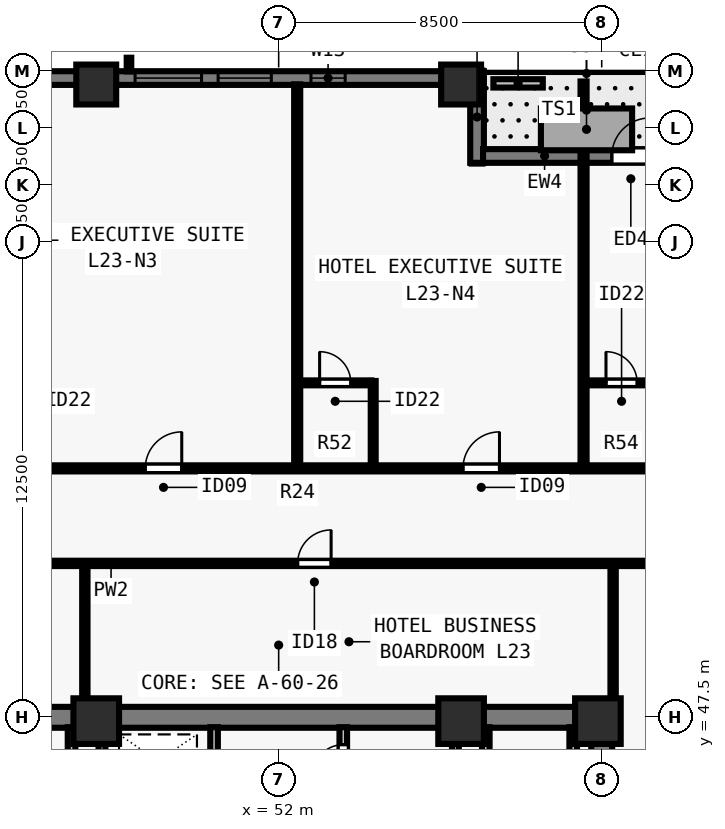
"""IFC4 building model, lengths in metres.
Left out: names, types, materials, properties, quantities, classifications, styles, units other than length and angle.
Written with IfcOpenShell. Run it as: python <this file> out.ifc"""

import sys

from ifc_helpers import new_model, si_unit, direction, frame, frame_2d, origin, origin_2d, place, context, subcontext, project, spatial, rectangle, extrude, element, fill, save


model = new_model("IFC4")
c1 = context("Model", 3, precision=1e-05, world=origin(), true_north=direction((0.0, 1.0)))
c2 = subcontext(c1, "Body", "Model", "MODEL_VIEW")
j1 = project(units=[si_unit("LENGTHUNIT", "METRE"), si_unit("PLANEANGLEUNIT", "RADIAN")], contexts=[c1])
p1 = place(None, origin())
s1 = spatial("IfcSite", under=j1, at=p1, CompositionType="ELEMENT")
p2 = place(p1, origin())
s2 = spatial("IfcBuilding", under=s1, at=p2, CompositionType="ELEMENT")
p3 = place(p2, frame((0.0, 0.0, 86.5)))
s3 = spatial("IfcBuildingStorey", under=s2, at=p3, CompositionType="ELEMENT", Elevation=86.5)
for number, where, z_axis, x_axis in (
    (1, (47.2, 47.4, 0.0), (0.0, 0.0, 1.0), (1.0, 0.0, 0.0)),
    (2, (56.8, 47.4, 0.0), (0.0, 0.0, 1.0), (1.0, 0.0, 0.0)),
    (3, (60.4, 47.4, 0.0), (0.0, 0.0, 1.0), (1.0, 0.0, 0.0)),
):
    element("IfcColumn", number, at=place(p3, frame(where, z_axis=z_axis, x_axis=x_axis)), inside=s3, PredefinedType="COLUMN", context=c2, shape_type="SweptSolid", body=[
        extrude(rectangle(XDim=1.2, YDim=1.2, at=origin_2d()), origin(), (0.0, 0.0, 1.0), 3.5),
    ])
for number, where, z_axis, x_axis in (
    (4, (56.8, 64.15, 0.0), (0.0, 0.0, 1.0), (1.0, 0.0, 0.0)),
    (5, (47.2, 64.15, 0.0), (0.0, 0.0, 1.0), (1.0, 0.0, 0.0)),
):
    element("IfcColumn", number, at=place(p3, frame(where, z_axis=z_axis, x_axis=x_axis)), inside=s3, PredefinedType="COLUMN", context=c2, shape_type="SweptSolid", body=[
        extrude(rectangle(XDim=1.05, YDim=1.05, at=origin_2d()), origin(), (0.0, 0.0, 1.0), 3.5),
    ])
p4 = place(p3, frame((29.5, 64.32, 0.0), z_axis=(0.0, 0.0, 1.0), x_axis=(1.0, 0.0, 0.0)))
e6 = element("IfcWall", 6, at=p4, inside=s3, PredefinedType="SOLIDWALL", context=c2, shape_type="SweptSolid", body=[
    extrude(rectangle(XDim=27.562, YDim=0.36, at=frame_2d((13.781, 0.0))), origin(), (0.0, 0.0, 1.0), 3.28),
])
p5 = place(p4, frame((4.18, 0.0, 0.8)))
e7 = element("IfcOpeningElement", 7, at=p5, cuts=e6, PredefinedType="OPENING", context=c2, shape_type="SweptSolid", body=[
    extrude(rectangle(XDim=1.75, YDim=1.544, at=frame_2d((0.875, 0.772))), frame((0.0, 0.19, 0.0), z_axis=(0.0, -1.0, 0.0), x_axis=(1.0, 0.0, 0.0)), (0.0, 0.0, 1.0), 0.38),
])
p6 = place(p4, frame((8.115, 0.0, 0.8)))
e8 = element("IfcOpeningElement", 8, at=p6, cuts=e6, PredefinedType="OPENING", context=c2, shape_type="SweptSolid", body=[
    extrude(rectangle(XDim=1.4, YDim=1.544, at=frame_2d((0.7, 0.772))), frame((0.0, 0.19, 0.0), z_axis=(0.0, -1.0, 0.0), x_axis=(1.0, 0.0, 0.0)), (0.0, 0.0, 1.0), 0.38),
])
p7 = place(p4, frame((11.251, 0.0, 0.8)))
e9 = element("IfcOpeningElement", 9, at=p7, cuts=e6, PredefinedType="OPENING", context=c2, shape_type="SweptSolid", body=[
    extrude(rectangle(XDim=1.75, YDim=1.544, at=frame_2d((0.875, 0.772))), frame((0.0, 0.19, 0.0), z_axis=(0.0, -1.0, 0.0), x_axis=(1.0, 0.0, 0.0)), (0.0, 0.0, 1.0), 0.38),
])
p8 = place(p4, frame((14.736, 0.0, 0.8)))
e10 = element("IfcOpeningElement", 10, at=p8, cuts=e6, PredefinedType="OPENING", context=c2, shape_type="SweptSolid", body=[
    extrude(rectangle(XDim=1.4, YDim=1.544, at=frame_2d((0.7, 0.772))), frame((0.0, 0.19, 0.0), z_axis=(0.0, -1.0, 0.0), x_axis=(1.0, 0.0, 0.0)), (0.0, 0.0, 1.0), 0.38),
])
p9 = place(p4, frame((18.721, 0.0, 0.8)))
e11 = element("IfcOpeningElement", 11, at=p9, cuts=e6, PredefinedType="OPENING", context=c2, shape_type="SweptSolid", body=[
    extrude(rectangle(XDim=1.75, YDim=1.544, at=frame_2d((0.875, 0.772))), frame((0.0, 0.19, 0.0), z_axis=(0.0, -1.0, 0.0), x_axis=(1.0, 0.0, 0.0)), (0.0, 0.0, 1.0), 0.38),
])
p10 = place(p4, frame((20.907, 0.0, 0.8)))
e12 = element("IfcOpeningElement", 12, at=p10, cuts=e6, PredefinedType="OPENING", context=c2, shape_type="SweptSolid", body=[
    extrude(rectangle(XDim=1.4, YDim=1.544, at=frame_2d((0.7, 0.772))), frame((0.0, 0.19, 0.0), z_axis=(0.0, -1.0, 0.0), x_axis=(1.0, 0.0, 0.0)), (0.0, 0.0, 1.0), 0.38),
])
p11 = place(p4, frame((23.35, 0.0, 0.8)))
e13 = element("IfcOpeningElement", 13, at=p11, cuts=e6, PredefinedType="OPENING", context=c2, shape_type="SweptSolid", body=[
    extrude(rectangle(XDim=0.9, YDim=1.544, at=frame_2d((0.45, 0.772))), frame((0.0, 0.19, 0.0), z_axis=(0.0, -1.0, 0.0), x_axis=(1.0, 0.0, 0.0)), (0.0, 0.0, 1.0), 0.38),
])
p12 = place(p3, frame((57.22, 64.5, 0.0), z_axis=(0.0, 0.0, 1.0), x_axis=(0.0, -1.0, 0.0)))
e14 = element("IfcWall", 14, at=p12, inside=s3, PredefinedType="SOLIDWALL", context=c2, shape_type="SweptSolid", body=[
    extrude(rectangle(XDim=2.41, YDim=0.36, at=frame_2d((1.205, 0.0))), origin(), (0.0, 0.0, 1.0), 3.28),
])
p13 = place(p3, frame((57.378, 62.27, 0.0), z_axis=(0.0, 0.0, 1.0), x_axis=(1.0, 0.0, 0.0)))
e15 = element("IfcWall", 15, at=p13, inside=s3, PredefinedType="SOLIDWALL", context=c2, shape_type="SweptSolid", body=[
    extrude(rectangle(XDim=5.782, YDim=0.36, at=frame_2d((2.891, 0.0))), origin(), (0.0, 0.0, 1.0), 3.28),
])
p14 = place(p13, frame((3.388, 0.0, 0.0)))
e16 = element("IfcOpeningElement", 16, at=p14, cuts=e15, PredefinedType="OPENING", context=c2, shape_type="SweptSolid", body=[
    extrude(rectangle(XDim=1.0, YDim=2.15, at=frame_2d((0.5, 1.075))), frame((0.0, 0.19, 0.0), z_axis=(0.0, -1.0, 0.0), x_axis=(1.0, 0.0, 0.0)), (0.0, 0.0, 1.0), 0.38),
])
p15 = place(p3, frame((57.65, 64.18, 0.0), z_axis=(0.0, 0.0, 1.0), x_axis=(1.0, 0.0, 0.0)))
e17 = element("IfcWall", 17, at=p15, inside=s3, PredefinedType="PARAPET", context=c2, shape_type="SweptSolid", body=[
    extrude(rectangle(XDim=1.3, YDim=0.22, at=frame_2d((0.65, 0.0))), origin(), (0.0, 0.0, 1.0), 0.55),
])
p16 = place(p3, frame((43.225, 47.5, 0.0), z_axis=(0.0, 0.0, 1.0), x_axis=(1.0, 0.0, 0.0)))
e18 = element("IfcWall", 18, at=p16, inside=s3, PredefinedType="SHEAR", context=c2, shape_type="SweptSolid", body=[
    extrude(rectangle(XDim=17.55, YDim=0.55, at=frame_2d((8.775, 0.0))), origin(), (0.0, 0.0, 1.0), 3.28),
])
p17 = place(p3, frame((60.5, 40.8, 0.0), z_axis=(0.0, 0.0, 1.0), x_axis=(0.0, 1.0, 0.0)))
e19 = element("IfcWall", 19, at=p17, inside=s3, PredefinedType="SHEAR", context=c2, shape_type="SweptSolid", body=[
    extrude(rectangle(XDim=6.435, YDim=0.55, at=frame_2d((3.218, 0.0))), origin(), (0.0, 0.0, 1.0), 3.28),
])
p18 = place(p3, frame((50.3, 40.585, 0.0), z_axis=(0.0, 0.0, 1.0), x_axis=(0.0, 1.0, 0.0)))
e20 = element("IfcWall", 20, at=p18, inside=s3, PredefinedType="SOLIDWALL", context=c2, shape_type="SweptSolid", body=[
    extrude(rectangle(XDim=6.655, YDim=0.2, at=frame_2d((3.328, 0.0))), origin(), (0.0, 0.0, 1.0), 3.28),
])
p19 = place(p18, frame((5.065, 0.0, 0.0)))
e21 = element("IfcOpeningElement", 21, at=p19, cuts=e20, PredefinedType="OPENING", context=c2, shape_type="SweptSolid", body=[
    extrude(rectangle(XDim=0.8, YDim=2.08, at=frame_2d((0.4, 1.04))), frame((0.0, 0.11, 0.0), z_axis=(0.0, -1.0, 0.0), x_axis=(1.0, 0.0, 0.0)), (0.0, 0.0, 1.0), 0.22),
])
p20 = place(p3, frame((53.7, 40.585, 0.0), z_axis=(0.0, 0.0, 1.0), x_axis=(0.0, 1.0, 0.0)))
e22 = element("IfcWall", 22, at=p20, inside=s3, PredefinedType="SOLIDWALL", context=c2, shape_type="SweptSolid", body=[
    extrude(rectangle(XDim=6.655, YDim=0.2, at=frame_2d((3.328, 0.0))), origin(), (0.0, 0.0, 1.0), 3.28),
])
p21 = place(p20, frame((0.195, 0.0, 0.0)))
e23 = element("IfcOpeningElement", 23, at=p21, cuts=e22, PredefinedType="OPENING", context=c2, shape_type="SweptSolid", body=[
    extrude(rectangle(XDim=0.8, YDim=2.08, at=frame_2d((0.4, 1.04))), frame((0.0, 0.11, 0.0), z_axis=(0.0, -1.0, 0.0), x_axis=(1.0, 0.0, 0.0)), (0.0, 0.0, 1.0), 0.22),
])
p22 = place(p20, frame((3.735, 0.0, 0.0)))
e24 = element("IfcOpeningElement", 24, at=p22, cuts=e22, PredefinedType="OPENING", context=c2, shape_type="SweptSolid", body=[
    extrude(rectangle(XDim=0.9, YDim=2.12, at=frame_2d((0.45, 1.06))), frame((0.0, 0.11, 0.0), z_axis=(0.0, -1.0, 0.0), x_axis=(1.0, 0.0, 0.0)), (0.0, 0.0, 1.0), 0.22),
])
p23 = place(p20, frame((5.395, 0.0, 0.0)))
e25 = element("IfcOpeningElement", 25, at=p23, cuts=e22, PredefinedType="OPENING", context=c2, shape_type="SweptSolid", body=[
    extrude(rectangle(XDim=0.8, YDim=2.1, at=frame_2d((0.4, 1.05))), frame((0.0, 0.11, 0.0), z_axis=(0.0, -1.0, 0.0), x_axis=(1.0, 0.0, 0.0)), (0.0, 0.0, 1.0), 0.22),
])
for number, where, z_axis, x_axis in (
    (26, (46.55, 43.735, 0.0), (0.0, 0.0, 1.0), (0.0, 1.0, 0.0)),
    (27, (57.45, 43.735, 0.0), (0.0, 0.0, 1.0), (0.0, 1.0, 0.0)),
    (28, (59.75, 43.735, 0.0), (0.0, 0.0, 1.0), (0.0, 1.0, 0.0)),
):
    element("IfcWall", number, at=place(p3, frame(where, z_axis=z_axis, x_axis=x_axis)), inside=s3, PredefinedType="SOLIDWALL", context=c2, shape_type="SweptSolid", body=[
        extrude(rectangle(XDim=3.505, YDim=0.2, at=frame_2d((1.752, 0.0))), origin(), (0.0, 0.0, 1.0), 3.28),
    ])
for number, where, z_axis, x_axis in (
    (29, (47.35, 43.735, 0.0), (0.0, 0.0, 1.0), (0.0, 1.0, 0.0)),
    (30, (56.65, 43.735, 0.0), (0.0, 0.0, 1.0), (0.0, 1.0, 0.0)),
):
    element("IfcWall", number, at=place(p3, frame(where, z_axis=z_axis, x_axis=x_axis)), inside=s3, PredefinedType="SOLIDWALL", context=c2, shape_type="SweptSolid", body=[
        extrude(rectangle(XDim=3.505, YDim=0.18, at=frame_2d((1.752, 0.0))), origin(), (0.0, 0.0, 1.0), 3.28),
    ])
p24 = place(p3, frame((37.1, 54.05, 0.0), z_axis=(0.0, 0.0, 1.0), x_axis=(1.0, 0.0, 0.0)))
e31 = element("IfcWall", 31, at=p24, inside=s3, PredefinedType="PARTITIONING", context=c2, shape_type="SweptSolid", body=[
    extrude(rectangle(XDim=29.8, YDim=0.16, at=frame_2d((14.9, 0.0))), origin(), (0.0, 0.0, 1.0), 3.28),
])
p25 = place(p24, frame((0.91, 0.0, 0.0)))
e32 = element("IfcOpeningElement", 32, at=p25, cuts=e31, PredefinedType="OPENING", context=c2, shape_type="SweptSolid", body=[
    extrude(rectangle(XDim=0.96, YDim=2.15, at=frame_2d((0.48, 1.075))), frame((0.0, 0.09, 0.0), z_axis=(0.0, -1.0, 0.0), x_axis=(1.0, 0.0, 0.0)), (0.0, 0.0, 1.0), 0.18),
])
p26 = place(p24, frame((3.03, 0.0, 0.0)))
e33 = element("IfcOpeningElement", 33, at=p26, cuts=e31, PredefinedType="OPENING", context=c2, shape_type="SweptSolid", body=[
    extrude(rectangle(XDim=0.96, YDim=2.15, at=frame_2d((0.48, 1.075))), frame((0.0, 0.09, 0.0), z_axis=(0.0, -1.0, 0.0), x_axis=(1.0, 0.0, 0.0)), (0.0, 0.0, 1.0), 0.18),
])
p27 = place(p24, frame((11.39, 0.0, 0.0)))
e34 = element("IfcOpeningElement", 34, at=p27, cuts=e31, PredefinedType="OPENING", context=c2, shape_type="SweptSolid", body=[
    extrude(rectangle(XDim=0.96, YDim=2.15, at=frame_2d((0.48, 1.075))), frame((0.0, 0.09, 0.0), z_axis=(0.0, -1.0, 0.0), x_axis=(1.0, 0.0, 0.0)), (0.0, 0.0, 1.0), 0.18),
])
p28 = place(p24, frame((19.75, 0.0, 0.0)))
e35 = element("IfcOpeningElement", 35, at=p28, cuts=e31, PredefinedType="OPENING", context=c2, shape_type="SweptSolid", body=[
    extrude(rectangle(XDim=0.96, YDim=2.15, at=frame_2d((0.48, 1.075))), frame((0.0, 0.09, 0.0), z_axis=(0.0, -1.0, 0.0), x_axis=(1.0, 0.0, 0.0)), (0.0, 0.0, 1.0), 0.18),
])
p29 = place(p24, frame((26.931, 0.0, 0.0)))
e36 = element("IfcOpeningElement", 36, at=p29, cuts=e31, PredefinedType="OPENING", context=c2, shape_type="SweptSolid", body=[
    extrude(rectangle(XDim=0.96, YDim=2.15, at=frame_2d((0.48, 1.075))), frame((0.0, 0.09, 0.0), z_axis=(0.0, -1.0, 0.0), x_axis=(1.0, 0.0, 0.0)), (0.0, 0.0, 1.0), 0.18),
])
p30 = place(p24, frame((28.48, 0.0, 0.0)))
e37 = element("IfcOpeningElement", 37, at=p30, cuts=e31, PredefinedType="OPENING", context=c2, shape_type="SweptSolid", body=[
    extrude(rectangle(XDim=0.96, YDim=2.15, at=frame_2d((0.48, 1.075))), frame((0.0, 0.09, 0.0), z_axis=(0.0, -1.0, 0.0), x_axis=(1.0, 0.0, 0.0)), (0.0, 0.0, 1.0), 0.18),
])
p31 = place(p3, frame((39.6, 51.55, 0.0), z_axis=(0.0, 0.0, 1.0), x_axis=(1.0, 0.0, 0.0)))
e38 = element("IfcWall", 38, at=p31, inside=s3, PredefinedType="PARTITIONING", context=c2, shape_type="SweptSolid", body=[
    extrude(rectangle(XDim=24.8, YDim=0.14, at=frame_2d((12.4, 0.0))), origin(), (0.0, 0.0, 1.0), 3.28),
])
p32 = place(p31, frame((2.2, 0.0, 0.0)))
e39 = element("IfcOpeningElement", 39, at=p32, cuts=e38, PredefinedType="OPENING", context=c2, shape_type="SweptSolid", body=[
    extrude(rectangle(XDim=0.88, YDim=2.1, at=frame_2d((0.44, 1.05))), frame((0.0, 0.08, 0.0), z_axis=(0.0, -1.0, 0.0), x_axis=(1.0, 0.0, 0.0)), (0.0, 0.0, 1.0), 0.16),
])
p33 = place(p31, frame((12.9, 0.0, 0.0)))
e40 = element("IfcOpeningElement", 40, at=p33, cuts=e38, PredefinedType="OPENING", context=c2, shape_type="SweptSolid", body=[
    extrude(rectangle(XDim=0.88, YDim=2.1, at=frame_2d((0.44, 1.05))), frame((0.0, 0.08, 0.0), z_axis=(0.0, -1.0, 0.0), x_axis=(1.0, 0.0, 0.0)), (0.0, 0.0, 1.0), 0.16),
])
p34 = place(p31, frame((22.4, 0.0, 0.0)))
e41 = element("IfcOpeningElement", 41, at=p34, cuts=e38, PredefinedType="OPENING", context=c2, shape_type="SweptSolid", body=[
    extrude(rectangle(XDim=0.88, YDim=2.1, at=frame_2d((0.44, 1.05))), frame((0.0, 0.08, 0.0), z_axis=(0.0, -1.0, 0.0), x_axis=(1.0, 0.0, 0.0)), (0.0, 0.0, 1.0), 0.16),
])
p35 = place(p3, frame((46.9, 47.76, 0.0), z_axis=(0.0, 0.0, 1.0), x_axis=(0.0, 1.0, 0.0)))
e42 = element("IfcWall", 42, at=p35, inside=s3, PredefinedType="PARTITIONING", context=c2, shape_type="SweptSolid", body=[
    extrude(rectangle(XDim=3.735, YDim=0.14, at=frame_2d((1.868, 0.0))), origin(), (0.0, 0.0, 1.0), 3.28),
])
p36 = place(p3, frame((60.8, 47.76, 0.0), z_axis=(0.0, 0.0, 1.0), x_axis=(0.0, 1.0, 0.0)))
e43 = element("IfcWall", 43, at=p36, inside=s3, PredefinedType="PARTITIONING", context=c2, shape_type="SweptSolid", body=[
    extrude(rectangle(XDim=3.735, YDim=0.14, at=frame_2d((1.868, 0.0))), origin(), (0.0, 0.0, 1.0), 2.439),
])
p37 = place(p3, frame((52.488, 54.115, 0.0), z_axis=(0.0, 0.0, 1.0), x_axis=(0.0, 1.0, 0.0)))
e44 = element("IfcWall", 44, at=p37, inside=s3, PredefinedType="PARTITIONING", context=c2, shape_type="SweptSolid", body=[
    extrude(rectangle(XDim=10.04, YDim=0.16, at=frame_2d((5.02, 0.0))), origin(), (0.0, 0.0, 1.0), 2.849),
])
p38 = place(p3, frame((54.488, 54.115, 0.0), z_axis=(0.0, 0.0, 1.0), x_axis=(0.0, 1.0, 0.0)))
e45 = element("IfcWall", 45, at=p38, inside=s3, PredefinedType="PLUMBINGWALL", context=c2, shape_type="SweptSolid", body=[
    extrude(rectangle(XDim=2.235, YDim=0.13, at=frame_2d((1.118, 0.0))), origin(), (0.0, 0.0, 1.0), 3.28),
])
p39 = place(p3, frame((52.552, 56.3, 0.0), z_axis=(0.0, 0.0, 1.0), x_axis=(1.0, 0.0, 0.0)))
e46 = element("IfcWall", 46, at=p39, inside=s3, PredefinedType="PLUMBINGWALL", context=c2, shape_type="SweptSolid", body=[
    extrude(rectangle(XDim=1.885, YDim=0.13, at=frame_2d((0.942, 0.0))), origin(), (0.0, 0.0, 1.0), 3.28),
])
p40 = place(p39, frame((0.525, 0.0, 0.0)))
e47 = element("IfcOpeningElement", 47, at=p40, cuts=e46, PredefinedType="OPENING", context=c2, shape_type="SweptSolid", body=[
    extrude(rectangle(XDim=0.82, YDim=2.1, at=frame_2d((0.41, 1.05))), frame((0.0, 0.075, 0.0), z_axis=(0.0, -1.0, 0.0), x_axis=(1.0, 0.0, 0.0)), (0.0, 0.0, 1.0), 0.15),
])
p41 = place(p3, frame((60.022, 54.115, 0.0), z_axis=(0.0, 0.0, 1.0), x_axis=(0.0, 1.0, 0.0)))
e48 = element("IfcWall", 48, at=p41, inside=s3, PredefinedType="PARTITIONING", context=c2, shape_type="SweptSolid", body=[
    extrude(rectangle(XDim=10.115, YDim=0.16, at=frame_2d((5.058, 0.0))), origin(), (0.0, 0.0, 1.0), 3.28),
])
p42 = place(p3, frame((60.087, 56.3, 0.0), z_axis=(0.0, 0.0, 1.0), x_axis=(1.0, 0.0, 0.0)))
e49 = element("IfcWall", 49, at=p42, inside=s3, PredefinedType="PLUMBINGWALL", context=c2, shape_type="SweptSolid", body=[
    extrude(rectangle(XDim=1.885, YDim=0.13, at=frame_2d((0.942, 0.0))), origin(), (0.0, 0.0, 1.0), 3.28),
])
p43 = place(p42, frame((0.525, 0.0, 0.0)))
e50 = element("IfcOpeningElement", 50, at=p43, cuts=e49, PredefinedType="OPENING", context=c2, shape_type="SweptSolid", body=[
    extrude(rectangle(XDim=0.82, YDim=2.1, at=frame_2d((0.41, 1.05))), frame((0.0, 0.075, 0.0), z_axis=(0.0, -1.0, 0.0), x_axis=(1.0, 0.0, 0.0)), (0.0, 0.0, 1.0), 0.15),
])
p44 = place(p9, origin())
e51 = element("IfcWindow", 51, at=p44, inside=s3, PartitioningType="SINGLE_PANEL", PredefinedType="WINDOW", context=c2, shape_type="SweptSolid", body=[
    extrude(rectangle(XDim=1.75, YDim=1.544, at=frame_2d((0.875, 0.772))), frame((0.0, -0.05, 0.0), z_axis=(0.0, -1.0, 0.0), x_axis=(1.0, 0.0, 0.0)), (0.0, 0.0, 1.0), 0.06),
])
fill(e11, e51)
p45 = place(p10, origin())
e52 = element("IfcWindow", 52, at=p45, inside=s3, PartitioningType="SINGLE_PANEL", PredefinedType="WINDOW", context=c2, shape_type="SweptSolid", body=[
    extrude(rectangle(XDim=1.4, YDim=1.544, at=frame_2d((0.7, 0.772))), frame((0.0, -0.05, 0.0), z_axis=(0.0, -1.0, 0.0), x_axis=(1.0, 0.0, 0.0)), (0.0, 0.0, 1.0), 0.06),
])
fill(e12, e52)
p46 = place(p14, origin())
e53 = element("IfcDoor", 53, at=p46, inside=s3, OperationType="SINGLE_SWING_RIGHT", PredefinedType="DOOR", context=c2, shape_type="SweptSolid", body=[
    extrude(rectangle(XDim=1.0, YDim=2.15, at=frame_2d((0.5, 1.075))), frame((0.0, 0.025, 0.0), z_axis=(0.0, -1.0, 0.0), x_axis=(1.0, 0.0, 0.0)), (0.0, 0.0, 1.0), 0.05),
])
fill(e16, e53)
p47 = place(p11, origin())
e54 = element("IfcWindow", 54, at=p47, inside=s3, PartitioningType="SINGLE_PANEL", PredefinedType="WINDOW", context=c2, shape_type="SweptSolid", body=[
    extrude(rectangle(XDim=0.9, YDim=1.544, at=frame_2d((0.45, 0.772))), frame((0.0, -0.04, 0.0), z_axis=(0.0, -1.0, 0.0), x_axis=(1.0, 0.0, 0.0)), (0.0, 0.0, 1.0), 0.06),
])
fill(e13, e54)
p48 = place(p23, origin())
e55 = element("IfcDoor", 55, at=p48, inside=s3, OperationType="SINGLE_SWING_LEFT", PredefinedType="DOOR", context=c2, shape_type="SweptSolid", body=[
    extrude(rectangle(XDim=0.8, YDim=2.1, at=frame_2d((0.4, 1.05))), frame((0.0, 0.025, 0.0), z_axis=(0.0, -1.0, 0.0), x_axis=(1.0, 0.0, 0.0)), (0.0, 0.0, 1.0), 0.05),
])
fill(e25, e55)
p49 = place(p33, origin())
e56 = element("IfcDoor", 56, at=p49, inside=s3, OperationType="SINGLE_SWING_RIGHT", PredefinedType="DOOR", context=c2, shape_type="SweptSolid", body=[
    extrude(rectangle(XDim=0.88, YDim=2.1, at=frame_2d((0.44, 1.05))), frame((0.0, 0.025, 0.0), z_axis=(0.0, -1.0, 0.0), x_axis=(1.0, 0.0, 0.0)), (0.0, 0.0, 1.0), 0.05),
])
fill(e40, e56)
p50 = place(p27, origin())
e57 = element("IfcDoor", 57, at=p50, inside=s3, OperationType="SINGLE_SWING_RIGHT", PredefinedType="DOOR", context=c2, shape_type="SweptSolid", body=[
    extrude(rectangle(XDim=0.96, YDim=2.15, at=frame_2d((0.48, 1.075))), frame((0.0, 0.025, 0.0), z_axis=(0.0, -1.0, 0.0), x_axis=(1.0, 0.0, 0.0)), (0.0, 0.0, 1.0), 0.05),
])
fill(e34, e57)
p51 = place(p40, origin())
e58 = element("IfcDoor", 58, at=p51, inside=s3, OperationType="SINGLE_SWING_LEFT", PredefinedType="DOOR", context=c2, shape_type="SweptSolid", body=[
    extrude(rectangle(XDim=0.82, YDim=2.1, at=frame_2d((0.41, 1.05))), frame((0.0, 0.025, 0.0), z_axis=(0.0, -1.0, 0.0), x_axis=(1.0, 0.0, 0.0)), (0.0, 0.0, 1.0), 0.05),
])
fill(e47, e58)
p52 = place(p28, origin())
e59 = element("IfcDoor", 59, at=p52, inside=s3, OperationType="SINGLE_SWING_RIGHT", PredefinedType="DOOR", context=c2, shape_type="SweptSolid", body=[
    extrude(rectangle(XDim=0.96, YDim=2.15, at=frame_2d((0.48, 1.075))), frame((0.0, 0.025, 0.0), z_axis=(0.0, -1.0, 0.0), x_axis=(1.0, 0.0, 0.0)), (0.0, 0.0, 1.0), 0.05),
])
fill(e35, e59)
p53 = place(p43, origin())
e60 = element("IfcDoor", 60, at=p53, inside=s3, OperationType="SINGLE_SWING_LEFT", PredefinedType="DOOR", context=c2, shape_type="SweptSolid", body=[
    extrude(rectangle(XDim=0.82, YDim=2.1, at=frame_2d((0.41, 1.05))), frame((0.0, 0.025, 0.0), z_axis=(0.0, -1.0, 0.0), x_axis=(1.0, 0.0, 0.0)), (0.0, 0.0, 1.0), 0.05),
])
fill(e50, e60)
save(model, sys.argv[1])
